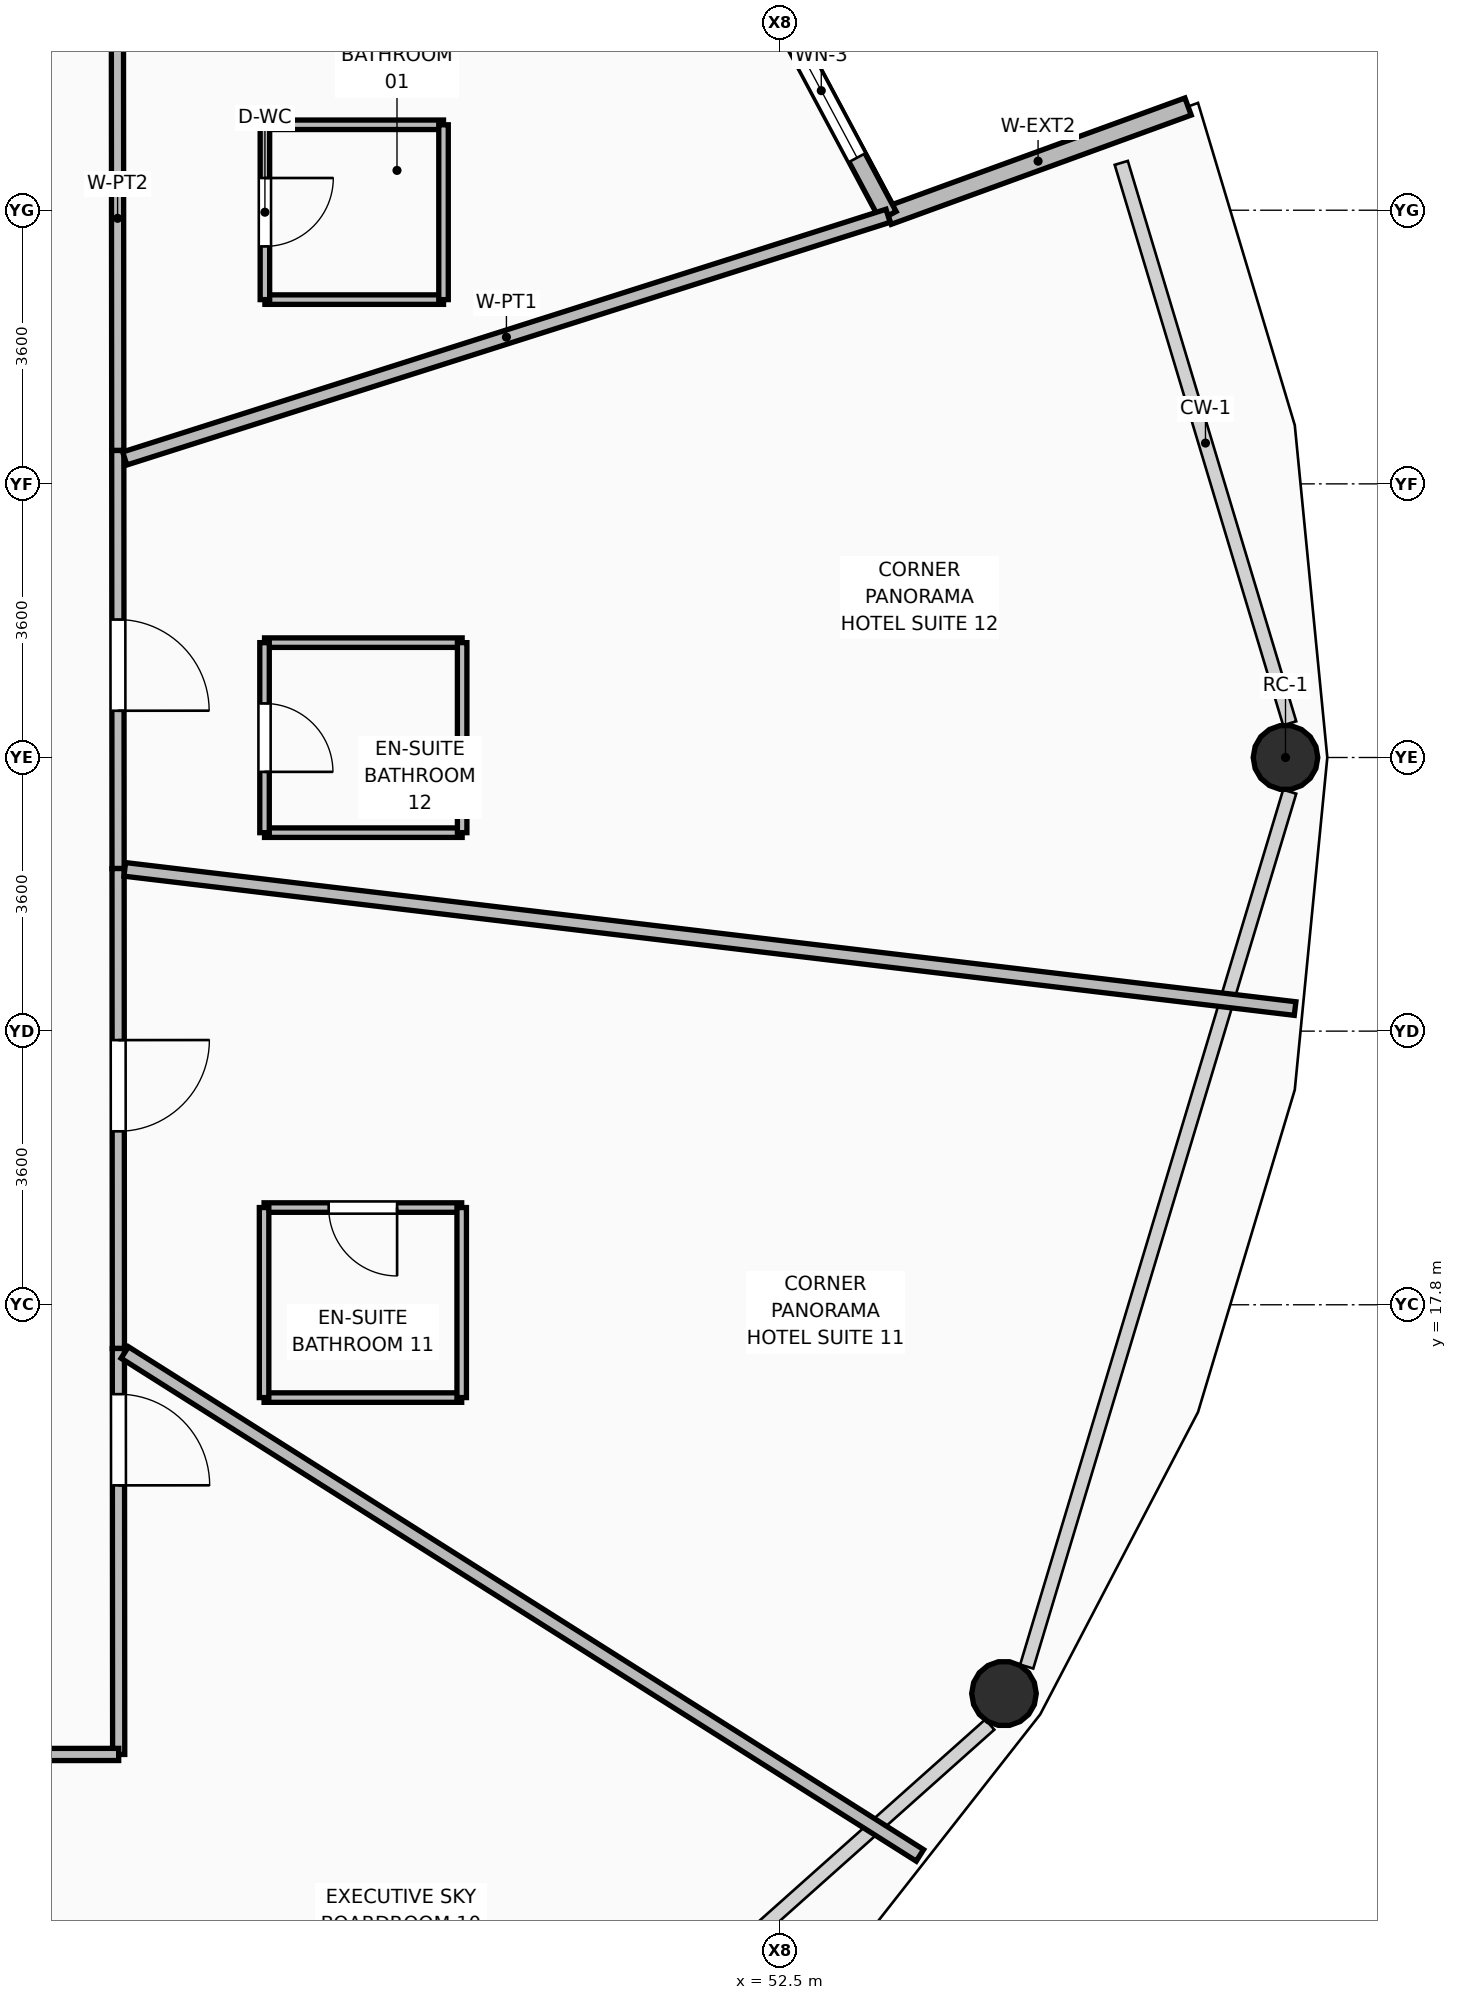
"""IFC4 building model, lengths in metres.
Left out: names, types, materials, properties, quantities, classifications, styles, units other than length and angle.
Written with IfcOpenShell. Run it as: python <this file> out.ifc"""

import sys

from ifc_helpers import new_model, si_unit, direction, frame, frame_2d, origin, origin_2d, place, context, subcontext, project, spatial, rectangle, hollow_circle, extrude, element, fill, save


model = new_model("IFC4")
c1 = context("Model", 3, precision=1e-05, world=origin(), true_north=direction((0.0, 1.0)))
c2 = subcontext(c1, "Body", "Model", "MODEL_VIEW")
j1 = project(units=[si_unit("LENGTHUNIT", "METRE"), si_unit("PLANEANGLEUNIT", "RADIAN")], contexts=[c1])
p1 = place(None, origin())
s1 = spatial("IfcSite", under=j1, at=p1, CompositionType="ELEMENT")
p2 = place(p1, origin())
s2 = spatial("IfcBuilding", under=s1, at=p2, CompositionType="ELEMENT")
p3 = place(p2, frame((0.0, 0.0, 72.0)))
s3 = spatial("IfcBuildingStorey", under=s2, at=p3, CompositionType="ELEMENT", Elevation=72.0)
for number, where, z_axis, x_axis in (
    (1, (59.15, 25.0, 0.0), (0.0, 0.0, 1.0), (1.0, 0.0, 0.0)),
    (2, (55.446, 12.685, 0.0), (0.0, 0.0, 1.0), (1.0, 0.0, 0.0)),
):
    element("IfcColumn", number, at=place(p3, frame(where, z_axis=z_axis, x_axis=x_axis)), inside=s3, PredefinedType="COLUMN", context=c2, shape_type="SweptSolid", body=[
        extrude(hollow_circle(Radius=0.425, WallThickness=0.04, at=origin_2d()), origin(), (0.0, 0.0, 1.0), 3.57),
    ])
p4 = place(p3, frame((57.868, 33.564, 0.0), z_axis=(0.0, 0.0, 1.0), x_axis=(-0.939660987195, -0.342107043399, 0.0)))
e3 = element("IfcWall", 3, at=p4, inside=s3, PredefinedType="SOLIDWALL", context=c2, shape_type="SweptSolid", body=[
    extrude(rectangle(XDim=4.2, YDim=0.24, at=frame_2d((2.1, 0.0))), origin(), (0.0, 0.0, 1.0), 3.57),
])
p5 = place(p3, frame((53.921, 32.127, 0.0), z_axis=(0.0, 0.0, 1.0), x_axis=(-0.471022801321, 0.88212103514, 0.0)))
e4 = element("IfcWall", 4, at=p5, inside=s3, PredefinedType="SOLIDWALL", context=c2, shape_type="SweptSolid", body=[
    extrude(rectangle(XDim=3.732, YDim=0.24, at=frame_2d((1.866, 0.0))), origin(), (0.0, 0.0, 1.0), 3.57),
])
p6 = place(p5, frame((0.866, 0.0, 0.85)))
e5 = element("IfcOpeningElement", 5, at=p6, cuts=e4, PredefinedType="OPENING", context=c2, shape_type="SweptSolid", body=[
    extrude(rectangle(XDim=2.0, YDim=2.4, at=frame_2d((1.0, 1.2))), frame((0.0, 0.13, 0.0), z_axis=(0.0, -1.0, 0.0), x_axis=(1.0, 0.0, 0.0)), (0.0, 0.0, 1.0), 0.26),
])
p7 = place(p3, frame((43.781, 35.148, 0.0), z_axis=(0.0, 0.0, 1.0), x_axis=(0.000799296364, -0.999999680563, 0.0)))
e6 = element("IfcWall", 6, at=p7, inside=s3, PredefinedType="PARTITIONING", context=c2, shape_type="SweptSolid", body=[
    extrude(rectangle(XDim=6.109, YDim=0.16, at=frame_2d((3.054, 0.0))), origin(), (0.0, 0.0, 1.0), 2.928),
])
p8 = place(p3, frame((43.786, 29.039, 0.0), z_axis=(0.0, 0.0, 1.0), x_axis=(0.000754616262, -0.999999715277, 0.0)))
e7 = element("IfcWall", 7, at=p8, inside=s3, PredefinedType="PARTITIONING", context=c2, shape_type="SweptSolid", body=[
    extrude(rectangle(XDim=5.5, YDim=0.16, at=frame_2d((2.75, 0.0))), origin(), (0.0, 0.0, 1.0), 3.55),
])
p9 = place(p8, frame((2.224, 0.0, 0.0)))
e8 = element("IfcOpeningElement", 8, at=p9, cuts=e7, PredefinedType="OPENING", context=c2, shape_type="SweptSolid", body=[
    extrude(rectangle(XDim=1.2, YDim=2.1, at=frame_2d((0.6, 1.05))), frame((0.0, 0.09, 0.0), z_axis=(0.0, -1.0, 0.0), x_axis=(1.0, 0.0, 0.0)), (0.0, 0.0, 1.0), 0.18),
])
p10 = place(p3, frame((43.79, 23.539, 0.0), z_axis=(0.0, 0.0, 1.0), x_axis=(0.000618668198, -0.999999808625, 0.0)))
e9 = element("IfcWall", 9, at=p10, inside=s3, PredefinedType="PARTITIONING", context=c2, shape_type="SweptSolid", body=[
    extrude(rectangle(XDim=6.314, YDim=0.16, at=frame_2d((3.157, 0.0))), origin(), (0.0, 0.0, 1.0), 2.928),
])
p11 = place(p10, frame((2.257, 0.0, 0.0)))
e10 = element("IfcOpeningElement", 10, at=p11, cuts=e9, PredefinedType="OPENING", context=c2, shape_type="SweptSolid", body=[
    extrude(rectangle(XDim=1.2, YDim=2.1, at=frame_2d((0.6, 1.05))), frame((0.0, 0.09, 0.0), z_axis=(0.0, -1.0, 0.0), x_axis=(1.0, 0.0, 0.0)), (0.0, 0.0, 1.0), 0.18),
])
p12 = place(p3, frame((43.794, 17.225, 0.0), z_axis=(0.0, 0.0, 1.0), x_axis=(0.000777071576, -0.99999969808, 0.0)))
e11 = element("IfcWall", 11, at=p12, inside=s3, PredefinedType="PARTITIONING", context=c2, shape_type="SweptSolid", body=[
    extrude(rectangle(XDim=5.341, YDim=0.16, at=frame_2d((2.67, 0.0))), origin(), (0.0, 0.0, 1.0), 2.928),
])
p13 = place(p12, frame((0.601, 0.0, 0.0)))
e12 = element("IfcOpeningElement", 12, at=p13, cuts=e11, PredefinedType="OPENING", context=c2, shape_type="SweptSolid", body=[
    extrude(rectangle(XDim=1.2, YDim=2.1, at=frame_2d((0.6, 1.05))), frame((0.0, 0.09, 0.0), z_axis=(0.0, -1.0, 0.0), x_axis=(1.0, 0.0, 0.0)), (0.0, 0.0, 1.0), 0.18),
])
p14 = place(p3, frame((43.798, 11.884, 0.0), z_axis=(0.0, 0.0, 1.0), x_axis=(-0.999999794312, -0.000641385261, 0.0)))
e13 = element("IfcWall", 13, at=p14, inside=s3, PredefinedType="PARTITIONING", context=c2, shape_type="SweptSolid", body=[
    extrude(rectangle(XDim=3.045, YDim=0.16, at=frame_2d((1.522, 0.0))), origin(), (0.0, 0.0, 1.0), 2.928),
])
p15 = place(p3, frame((43.878, 28.934, 0.0), z_axis=(0.0, 0.0, 1.0), x_axis=(0.95299755794, 0.302977977021, 0.0)))
e14 = element("IfcWall", 14, at=p15, inside=s3, PredefinedType="PARTITIONING", context=c2, shape_type="SweptSolid", body=[
    extrude(rectangle(XDim=10.538, YDim=0.18, at=frame_2d((5.269, 0.0))), origin(), (0.0, 0.0, 1.0), 3.55),
])
p16 = place(p3, frame((40.82, 11.788, 0.0), z_axis=(0.0, 0.0, 1.0), x_axis=(0.576393717645, -0.817172125234, 0.0)))
e15 = element("IfcWall", 15, at=p16, inside=s3, PredefinedType="PARTITIONING", context=c2, shape_type="SweptSolid", body=[
    extrude(rectangle(XDim=9.736, YDim=0.18, at=frame_2d((4.868, 0.0))), origin(), (0.0, 0.0, 1.0), 2.775),
])
p17 = place(p3, frame((43.878, 17.172, 0.0), z_axis=(0.0, 0.0, 1.0), x_axis=(0.845177570146, -0.534485617132, 0.0)))
e16 = element("IfcWall", 16, at=p17, inside=s3, PredefinedType="PARTITIONING", context=c2, shape_type="SweptSolid", body=[
    extrude(rectangle(XDim=12.379, YDim=0.18, at=frame_2d((6.189, 0.0))), origin(), (0.0, 0.0, 1.0), 2.775),
])
p18 = place(p3, frame((43.878, 23.528, 0.0), z_axis=(0.0, 0.0, 1.0), x_axis=(0.993003667009, -0.118083518354, 0.0)))
e17 = element("IfcWall", 17, at=p18, inside=s3, PredefinedType="PARTITIONING", context=c2, shape_type="SweptSolid", body=[
    extrude(rectangle(XDim=15.506, YDim=0.18, at=frame_2d((7.753, 0.0))), origin(), (0.0, 0.0, 1.0), 2.775),
])
for number, where, z_axis, x_axis in (
    (18, (45.722, 31.024, 0.0), (0.0, 0.0, 1.0), (1.0, 0.0, 0.0)),
    (19, (45.722, 33.324, 0.0), (0.0, 0.0, 1.0), (1.0, 0.0, 0.0)),
):
    element("IfcWall", number, at=place(p3, frame(where, z_axis=z_axis, x_axis=x_axis)), inside=s3, PredefinedType="PARTITIONING", context=c2, shape_type="SweptSolid", body=[
        extrude(rectangle(XDim=2.35, YDim=0.125, at=frame_2d((1.175, 0.0))), origin(), (0.0, 0.0, 1.0), 3.55),
    ])
p19 = place(p3, frame((45.722, 31.024, 0.0), z_axis=(0.0, 0.0, 1.0), x_axis=(0.0, 1.0, 0.0)))
e20 = element("IfcWall", 20, at=p19, inside=s3, PredefinedType="PARTITIONING", context=c2, shape_type="SweptSolid", body=[
    extrude(rectangle(XDim=2.3, YDim=0.125, at=frame_2d((1.15, 0.0))), origin(), (0.0, 0.0, 1.0), 3.55),
])
p20 = place(p19, frame((0.7, 0.0, 0.0)))
e21 = element("IfcOpeningElement", 21, at=p20, cuts=e20, PredefinedType="OPENING", context=c2, shape_type="SweptSolid", body=[
    extrude(rectangle(XDim=0.9, YDim=2.1, at=frame_2d((0.45, 1.05))), frame((0.0, 0.073, 0.0), z_axis=(0.0, -1.0, 0.0), x_axis=(1.0, 0.0, 0.0)), (0.0, 0.0, 1.0), 0.145),
])
p21 = place(p3, frame((48.072, 31.024, 0.0), z_axis=(0.0, 0.0, 1.0), x_axis=(0.0, 1.0, 0.0)))
e22 = element("IfcWall", 22, at=p21, inside=s3, PredefinedType="PARTITIONING", context=c2, shape_type="SweptSolid", body=[
    extrude(rectangle(XDim=2.3, YDim=0.125, at=frame_2d((1.15, 0.0))), origin(), (0.0, 0.0, 1.0), 3.55),
])
p22 = place(p3, frame((45.711, 16.579, 0.0), z_axis=(0.0, 0.0, 1.0), x_axis=(1.0, 0.0, 0.0)))
e23 = element("IfcWall", 23, at=p22, inside=s3, PredefinedType="PARTITIONING", context=c2, shape_type="SweptSolid", body=[
    extrude(rectangle(XDim=2.6, YDim=0.125, at=frame_2d((1.3, 0.0))), origin(), (0.0, 0.0, 1.0), 3.55),
])
p23 = place(p3, frame((45.711, 19.079, 0.0), z_axis=(0.0, 0.0, 1.0), x_axis=(1.0, 0.0, 0.0)))
e24 = element("IfcWall", 24, at=p23, inside=s3, PredefinedType="PARTITIONING", context=c2, shape_type="SweptSolid", body=[
    extrude(rectangle(XDim=2.6, YDim=0.125, at=frame_2d((1.3, 0.0))), origin(), (0.0, 0.0, 1.0), 3.55),
])
p24 = place(p23, frame((0.85, 0.0, 0.0)))
e25 = element("IfcOpeningElement", 25, at=p24, cuts=e24, PredefinedType="OPENING", context=c2, shape_type="SweptSolid", body=[
    extrude(rectangle(XDim=0.9, YDim=2.1, at=frame_2d((0.45, 1.05))), frame((0.0, 0.073, 0.0), z_axis=(0.0, -1.0, 0.0), x_axis=(1.0, 0.0, 0.0)), (0.0, 0.0, 1.0), 0.145),
])
for number, where, z_axis, x_axis in (
    (26, (45.711, 16.579, 0.0), (0.0, 0.0, 1.0), (0.0, 1.0, 0.0)),
    (27, (48.311, 16.579, 0.0), (0.0, 0.0, 1.0), (0.0, 1.0, 0.0)),
):
    element("IfcWall", number, at=place(p3, frame(where, z_axis=z_axis, x_axis=x_axis)), inside=s3, PredefinedType="PARTITIONING", context=c2, shape_type="SweptSolid", body=[
        extrude(rectangle(XDim=2.5, YDim=0.125, at=frame_2d((1.25, 0.0))), origin(), (0.0, 0.0, 1.0), 3.55),
    ])
for number, where, z_axis, x_axis in (
    (28, (45.717, 24.011, 0.0), (0.0, 0.0, 1.0), (1.0, 0.0, 0.0)),
    (29, (45.717, 26.511, 0.0), (0.0, 0.0, 1.0), (1.0, 0.0, 0.0)),
):
    element("IfcWall", number, at=place(p3, frame(where, z_axis=z_axis, x_axis=x_axis)), inside=s3, PredefinedType="PARTITIONING", context=c2, shape_type="SweptSolid", body=[
        extrude(rectangle(XDim=2.6, YDim=0.125, at=frame_2d((1.3, 0.0))), origin(), (0.0, 0.0, 1.0), 3.55),
    ])
p25 = place(p3, frame((45.717, 24.011, 0.0), z_axis=(0.0, 0.0, 1.0), x_axis=(0.0, 1.0, 0.0)))
e30 = element("IfcWall", 30, at=p25, inside=s3, PredefinedType="PARTITIONING", context=c2, shape_type="SweptSolid", body=[
    extrude(rectangle(XDim=2.5, YDim=0.125, at=frame_2d((1.25, 0.0))), origin(), (0.0, 0.0, 1.0), 3.55),
])
p26 = place(p25, frame((0.8, 0.0, 0.0)))
e31 = element("IfcOpeningElement", 31, at=p26, cuts=e30, PredefinedType="OPENING", context=c2, shape_type="SweptSolid", body=[
    extrude(rectangle(XDim=0.9, YDim=2.1, at=frame_2d((0.45, 1.05))), frame((0.0, 0.073, 0.0), z_axis=(0.0, -1.0, 0.0), x_axis=(1.0, 0.0, 0.0)), (0.0, 0.0, 1.0), 0.145),
])
p27 = place(p3, frame((48.317, 24.011, 0.0), z_axis=(0.0, 0.0, 1.0), x_axis=(0.0, 1.0, 0.0)))
e32 = element("IfcWall", 32, at=p27, inside=s3, PredefinedType="PARTITIONING", context=c2, shape_type="SweptSolid", body=[
    extrude(rectangle(XDim=2.5, YDim=0.125, at=frame_2d((1.25, 0.0))), origin(), (0.0, 0.0, 1.0), 3.55),
])
p28 = place(p6, origin())
e33 = element("IfcWindow", 33, at=p28, inside=s3, PartitioningType="SINGLE_PANEL", PredefinedType="WINDOW", context=c2, shape_type="SweptSolid", body=[
    extrude(rectangle(XDim=2.0, YDim=2.4, at=frame_2d((1.0, 1.2))), frame((0.0, 0.03, 0.0), z_axis=(0.0, -1.0, 0.0), x_axis=(1.0, 0.0, 0.0)), (0.0, 0.0, 1.0), 0.06),
])
fill(e5, e33)
p29 = place(p20, frame((0.9, 0.0, 0.0), z_axis=(0.0, 0.0, 1.0), x_axis=(-1.0, 0.0, 0.0)))
e34 = element("IfcDoor", 34, at=p29, inside=s3, OperationType="SINGLE_SWING_LEFT", PredefinedType="DOOR", context=c2, shape_type="SweptSolid", body=[
    extrude(rectangle(XDim=0.9, YDim=2.1, at=frame_2d((0.45, 1.05))), frame((0.0, 0.025, 0.0), z_axis=(0.0, -1.0, 0.0), x_axis=(1.0, 0.0, 0.0)), (0.0, 0.0, 1.0), 0.05),
])
fill(e21, e34)
p30 = place(p13, origin())
e35 = element("IfcDoor", 35, at=p30, inside=s3, OperationType="SINGLE_SWING_RIGHT", PredefinedType="DOOR", context=c2, shape_type="SweptSolid", body=[
    extrude(rectangle(XDim=1.2, YDim=2.1, at=frame_2d((0.6, 1.05))), frame((0.0, 0.025, 0.0), z_axis=(0.0, -1.0, 0.0), x_axis=(1.0, 0.0, 0.0)), (0.0, 0.0, 1.0), 0.05),
])
fill(e12, e35)
p31 = place(p24, frame((0.9, 0.0, 0.0), z_axis=(0.0, 0.0, 1.0), x_axis=(-1.0, 0.0, 0.0)))
e36 = element("IfcDoor", 36, at=p31, inside=s3, OperationType="SINGLE_SWING_LEFT", PredefinedType="DOOR", context=c2, shape_type="SweptSolid", body=[
    extrude(rectangle(XDim=0.9, YDim=2.1, at=frame_2d((0.45, 1.05))), frame((0.0, 0.025, 0.0), z_axis=(0.0, -1.0, 0.0), x_axis=(1.0, 0.0, 0.0)), (0.0, 0.0, 1.0), 0.05),
])
fill(e25, e36)
p32 = place(p11, origin())
e37 = element("IfcDoor", 37, at=p32, inside=s3, OperationType="SINGLE_SWING_LEFT", PredefinedType="DOOR", context=c2, shape_type="SweptSolid", body=[
    extrude(rectangle(XDim=1.2, YDim=2.1, at=frame_2d((0.6, 1.05))), frame((0.0, 0.025, 0.0), z_axis=(0.0, -1.0, 0.0), x_axis=(1.0, 0.0, 0.0)), (0.0, 0.0, 1.0), 0.05),
])
fill(e10, e37)
p33 = place(p26, frame((0.9, 0.0, 0.0), z_axis=(0.0, 0.0, 1.0), x_axis=(-1.0, 0.0, 0.0)))
e38 = element("IfcDoor", 38, at=p33, inside=s3, OperationType="SINGLE_SWING_RIGHT", PredefinedType="DOOR", context=c2, shape_type="SweptSolid", body=[
    extrude(rectangle(XDim=0.9, YDim=2.1, at=frame_2d((0.45, 1.05))), frame((0.0, 0.025, 0.0), z_axis=(0.0, -1.0, 0.0), x_axis=(1.0, 0.0, 0.0)), (0.0, 0.0, 1.0), 0.05),
])
fill(e31, e38)
p34 = place(p9, origin())
e39 = element("IfcDoor", 39, at=p34, inside=s3, OperationType="SINGLE_SWING_RIGHT", PredefinedType="DOOR", context=c2, shape_type="SweptSolid", body=[
    extrude(rectangle(XDim=1.2, YDim=2.1, at=frame_2d((0.6, 1.05))), frame((0.0, 0.025, 0.0), z_axis=(0.0, -1.0, 0.0), x_axis=(1.0, 0.0, 0.0)), (0.0, 0.0, 1.0), 0.05),
])
fill(e8, e39)
save(model, sys.argv[1])
